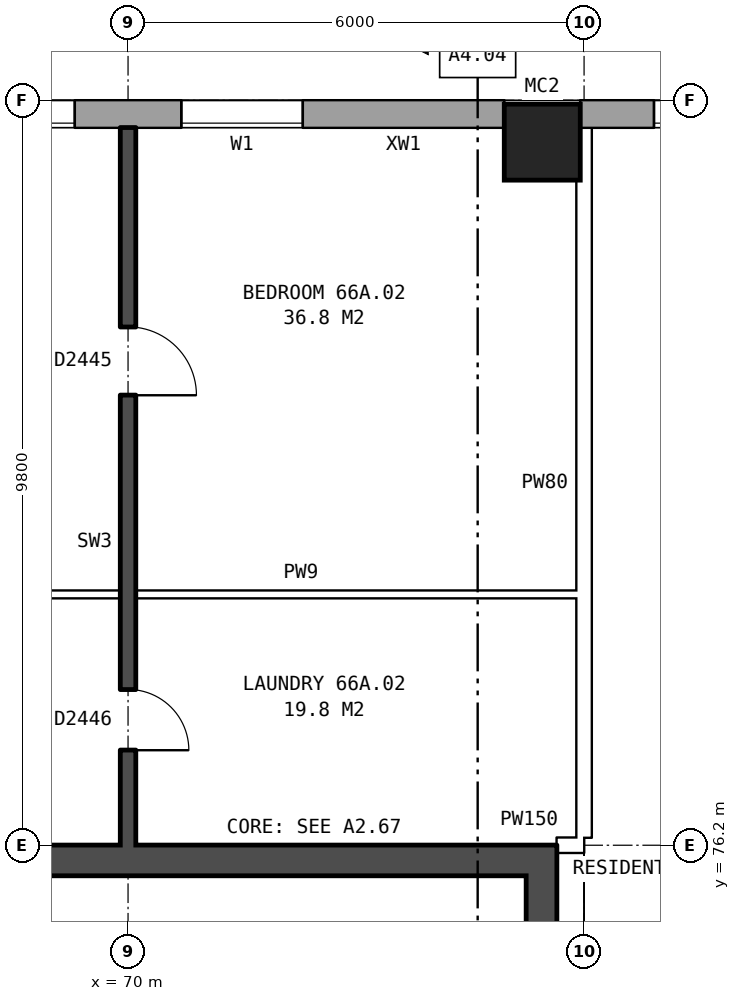
"""IFC4 building model, lengths in metres.
Left out: names, types, materials, properties, quantities, classifications, styles, units other than length and angle.
Written with IfcOpenShell. Run it as: python <this file> out.ifc"""

import sys

from ifc_helpers import new_model, si_unit, direction, frame, frame_2d, origin, origin_2d, place, context, subcontext, project, spatial, rectangle, hollow_rectangle, extrude, element, fill, save


model = new_model("IFC4")
c1 = context("Model", 3, precision=1e-05, world=origin(), true_north=direction((0.0, 1.0)))
c2 = subcontext(c1, "Body", "Model", "MODEL_VIEW")
j1 = project(units=[si_unit("LENGTHUNIT", "METRE"), si_unit("PLANEANGLEUNIT", "RADIAN")], contexts=[c1])
p1 = place(None, origin())
s1 = spatial("IfcSite", under=j1, at=p1, CompositionType="ELEMENT")
p2 = place(p1, origin())
s2 = spatial("IfcBuilding", under=s1, at=p2, CompositionType="ELEMENT")
p3 = place(p2, frame((0.0, 0.0, 233.8)))
s3 = spatial("IfcBuildingStorey", under=s2, at=p3, CompositionType="ELEMENT", Elevation=233.8)
p4 = place(p3, frame((75.45, 85.45, 0.0), z_axis=(0.0, 0.0, 1.0), x_axis=(1.0, 0.0, 0.0)))
e1 = element("IfcColumn", 1, at=p4, inside=s3, PredefinedType="COLUMN", context=c2, shape_type="SweptSolid", body=[
    extrude(hollow_rectangle(XDim=1.0, YDim=1.0, WallThickness=0.055, at=origin_2d()), origin(), (0.0, 0.0, 1.0), 3.1),
])
p5 = place(p3, frame((131.05, 85.82, 0.0), z_axis=(0.0, 0.0, 1.0), x_axis=(-1.0, 0.0, 0.0)))
e2 = element("IfcWall", 2, at=p5, inside=s3, PredefinedType="STANDARD", context=c2, shape_type="SweptSolid", body=[
    extrude(rectangle(XDim=55.1, YDim=0.36, at=frame_2d((27.55, 0.0))), origin(), (0.0, 0.0, 1.0), 2.85),
])
p6 = place(p5, frame((0.969, 0.0, 0.8)))
e3 = element("IfcOpeningElement", 3, at=p6, cuts=e2, PredefinedType="OPENING", context=c2, shape_type="SweptSolid", body=[
    extrude(rectangle(XDim=1.6, YDim=1.8, at=frame_2d((0.8, 0.9))), frame((0.0, 0.19, 0.0), z_axis=(0.0, -1.0, 0.0), x_axis=(1.0, 0.0, 0.0)), (0.0, 0.0, 1.0), 0.38),
])
p7 = place(p5, frame((4.406, 0.0, 0.8)))
e4 = element("IfcOpeningElement", 4, at=p7, cuts=e2, PredefinedType="OPENING", context=c2, shape_type="SweptSolid", body=[
    extrude(rectangle(XDim=1.6, YDim=1.8, at=frame_2d((0.8, 0.9))), frame((0.0, 0.19, 0.0), z_axis=(0.0, -1.0, 0.0), x_axis=(1.0, 0.0, 0.0)), (0.0, 0.0, 1.0), 0.38),
])
p8 = place(p5, frame((7.844, 0.0, 0.8)))
e5 = element("IfcOpeningElement", 5, at=p8, cuts=e2, PredefinedType="OPENING", context=c2, shape_type="SweptSolid", body=[
    extrude(rectangle(XDim=1.6, YDim=1.8, at=frame_2d((0.8, 0.9))), frame((0.0, 0.19, 0.0), z_axis=(0.0, -1.0, 0.0), x_axis=(1.0, 0.0, 0.0)), (0.0, 0.0, 1.0), 0.38),
])
p9 = place(p5, frame((11.281, 0.0, 0.8)))
e6 = element("IfcOpeningElement", 6, at=p9, cuts=e2, PredefinedType="OPENING", context=c2, shape_type="SweptSolid", body=[
    extrude(rectangle(XDim=1.6, YDim=1.8, at=frame_2d((0.8, 0.9))), frame((0.0, 0.19, 0.0), z_axis=(0.0, -1.0, 0.0), x_axis=(1.0, 0.0, 0.0)), (0.0, 0.0, 1.0), 0.38),
])
p10 = place(p5, frame((14.719, 0.0, 0.8)))
e7 = element("IfcOpeningElement", 7, at=p10, cuts=e2, PredefinedType="OPENING", context=c2, shape_type="SweptSolid", body=[
    extrude(rectangle(XDim=1.6, YDim=1.8, at=frame_2d((0.8, 0.9))), frame((0.0, 0.19, 0.0), z_axis=(0.0, -1.0, 0.0), x_axis=(1.0, 0.0, 0.0)), (0.0, 0.0, 1.0), 0.38),
])
p11 = place(p5, frame((18.156, 0.0, 0.8)))
e8 = element("IfcOpeningElement", 8, at=p11, cuts=e2, PredefinedType="OPENING", context=c2, shape_type="SweptSolid", body=[
    extrude(rectangle(XDim=1.6, YDim=1.8, at=frame_2d((0.8, 0.9))), frame((0.0, 0.19, 0.0), z_axis=(0.0, -1.0, 0.0), x_axis=(1.0, 0.0, 0.0)), (0.0, 0.0, 1.0), 0.38),
])
p12 = place(p5, frame((21.594, 0.0, 0.8)))
e9 = element("IfcOpeningElement", 9, at=p12, cuts=e2, PredefinedType="OPENING", context=c2, shape_type="SweptSolid", body=[
    extrude(rectangle(XDim=1.6, YDim=1.8, at=frame_2d((0.8, 0.9))), frame((0.0, 0.19, 0.0), z_axis=(0.0, -1.0, 0.0), x_axis=(1.0, 0.0, 0.0)), (0.0, 0.0, 1.0), 0.38),
])
p13 = place(p5, frame((25.031, 0.0, 0.8)))
e10 = element("IfcOpeningElement", 10, at=p13, cuts=e2, PredefinedType="OPENING", context=c2, shape_type="SweptSolid", body=[
    extrude(rectangle(XDim=1.6, YDim=1.8, at=frame_2d((0.8, 0.9))), frame((0.0, 0.19, 0.0), z_axis=(0.0, -1.0, 0.0), x_axis=(1.0, 0.0, 0.0)), (0.0, 0.0, 1.0), 0.38),
])
p14 = place(p5, frame((28.469, 0.0, 0.8)))
e11 = element("IfcOpeningElement", 11, at=p14, cuts=e2, PredefinedType="OPENING", context=c2, shape_type="SweptSolid", body=[
    extrude(rectangle(XDim=1.6, YDim=1.8, at=frame_2d((0.8, 0.9))), frame((0.0, 0.19, 0.0), z_axis=(0.0, -1.0, 0.0), x_axis=(1.0, 0.0, 0.0)), (0.0, 0.0, 1.0), 0.38),
])
p15 = place(p5, frame((31.906, 0.0, 0.8)))
e12 = element("IfcOpeningElement", 12, at=p15, cuts=e2, PredefinedType="OPENING", context=c2, shape_type="SweptSolid", body=[
    extrude(rectangle(XDim=1.6, YDim=1.8, at=frame_2d((0.8, 0.9))), frame((0.0, 0.19, 0.0), z_axis=(0.0, -1.0, 0.0), x_axis=(1.0, 0.0, 0.0)), (0.0, 0.0, 1.0), 0.38),
])
p16 = place(p5, frame((35.344, 0.0, 0.8)))
e13 = element("IfcOpeningElement", 13, at=p16, cuts=e2, PredefinedType="OPENING", context=c2, shape_type="SweptSolid", body=[
    extrude(rectangle(XDim=1.6, YDim=1.8, at=frame_2d((0.8, 0.9))), frame((0.0, 0.19, 0.0), z_axis=(0.0, -1.0, 0.0), x_axis=(1.0, 0.0, 0.0)), (0.0, 0.0, 1.0), 0.38),
])
p17 = place(p5, frame((38.781, 0.0, 0.8)))
e14 = element("IfcOpeningElement", 14, at=p17, cuts=e2, PredefinedType="OPENING", context=c2, shape_type="SweptSolid", body=[
    extrude(rectangle(XDim=1.6, YDim=1.8, at=frame_2d((0.8, 0.9))), frame((0.0, 0.19, 0.0), z_axis=(0.0, -1.0, 0.0), x_axis=(1.0, 0.0, 0.0)), (0.0, 0.0, 1.0), 0.38),
])
p18 = place(p5, frame((42.219, 0.0, 0.8)))
e15 = element("IfcOpeningElement", 15, at=p18, cuts=e2, PredefinedType="OPENING", context=c2, shape_type="SweptSolid", body=[
    extrude(rectangle(XDim=1.6, YDim=1.8, at=frame_2d((0.8, 0.9))), frame((0.0, 0.19, 0.0), z_axis=(0.0, -1.0, 0.0), x_axis=(1.0, 0.0, 0.0)), (0.0, 0.0, 1.0), 0.38),
])
p19 = place(p5, frame((45.656, 0.0, 0.8)))
e16 = element("IfcOpeningElement", 16, at=p19, cuts=e2, PredefinedType="OPENING", context=c2, shape_type="SweptSolid", body=[
    extrude(rectangle(XDim=1.6, YDim=1.8, at=frame_2d((0.8, 0.9))), frame((0.0, 0.19, 0.0), z_axis=(0.0, -1.0, 0.0), x_axis=(1.0, 0.0, 0.0)), (0.0, 0.0, 1.0), 0.38),
])
p20 = place(p5, frame((49.094, 0.0, 0.8)))
e17 = element("IfcOpeningElement", 17, at=p20, cuts=e2, PredefinedType="OPENING", context=c2, shape_type="SweptSolid", body=[
    extrude(rectangle(XDim=1.6, YDim=1.8, at=frame_2d((0.8, 0.9))), frame((0.0, 0.19, 0.0), z_axis=(0.0, -1.0, 0.0), x_axis=(1.0, 0.0, 0.0)), (0.0, 0.0, 1.0), 0.38),
])
p21 = place(p5, frame((52.531, 0.0, 0.8)))
e18 = element("IfcOpeningElement", 18, at=p21, cuts=e2, PredefinedType="OPENING", context=c2, shape_type="SweptSolid", body=[
    extrude(rectangle(XDim=1.6, YDim=1.8, at=frame_2d((0.8, 0.9))), frame((0.0, 0.19, 0.0), z_axis=(0.0, -1.0, 0.0), x_axis=(1.0, 0.0, 0.0)), (0.0, 0.0, 1.0), 0.38),
])
p22 = place(p3, frame((74.95, 85.82, 0.0), z_axis=(0.0, 0.0, 1.0), x_axis=(-1.0, 0.0, 0.0)))
e19 = element("IfcWall", 19, at=p22, inside=s3, PredefinedType="STANDARD", context=c2, shape_type="SweptSolid", body=[
    extrude(rectangle(XDim=39.875, YDim=0.36, at=frame_2d((19.938, 0.0))), origin(), (0.0, 0.0, 1.0), 2.85),
])
p23 = place(p22, frame((2.65, 0.0, 0.8)))
e20 = element("IfcOpeningElement", 20, at=p23, cuts=e19, PredefinedType="OPENING", context=c2, shape_type="SweptSolid", body=[
    extrude(rectangle(XDim=1.6, YDim=1.8, at=frame_2d((0.8, 0.9))), frame((0.0, 0.19, 0.0), z_axis=(0.0, -1.0, 0.0), x_axis=(1.0, 0.0, 0.0)), (0.0, 0.0, 1.0), 0.38),
])
p24 = place(p22, frame((5.65, 0.0, 0.8)))
e21 = element("IfcOpeningElement", 21, at=p24, cuts=e19, PredefinedType="OPENING", context=c2, shape_type="SweptSolid", body=[
    extrude(rectangle(XDim=1.6, YDim=1.8, at=frame_2d((0.8, 0.9))), frame((0.0, 0.19, 0.0), z_axis=(0.0, -1.0, 0.0), x_axis=(1.0, 0.0, 0.0)), (0.0, 0.0, 1.0), 0.38),
])
p25 = place(p22, frame((8.65, 0.0, 0.8)))
e22 = element("IfcOpeningElement", 22, at=p25, cuts=e19, PredefinedType="OPENING", context=c2, shape_type="SweptSolid", body=[
    extrude(rectangle(XDim=1.6, YDim=1.8, at=frame_2d((0.8, 0.9))), frame((0.0, 0.19, 0.0), z_axis=(0.0, -1.0, 0.0), x_axis=(1.0, 0.0, 0.0)), (0.0, 0.0, 1.0), 0.38),
])
p26 = place(p22, frame((11.65, 0.0, 0.8)))
e23 = element("IfcOpeningElement", 23, at=p26, cuts=e19, PredefinedType="OPENING", context=c2, shape_type="SweptSolid", body=[
    extrude(rectangle(XDim=1.6, YDim=1.8, at=frame_2d((0.8, 0.9))), frame((0.0, 0.19, 0.0), z_axis=(0.0, -1.0, 0.0), x_axis=(1.0, 0.0, 0.0)), (0.0, 0.0, 1.0), 0.38),
])
p27 = place(p22, frame((14.65, 0.0, 0.8)))
e24 = element("IfcOpeningElement", 24, at=p27, cuts=e19, PredefinedType="OPENING", context=c2, shape_type="SweptSolid", body=[
    extrude(rectangle(XDim=1.6, YDim=1.8, at=frame_2d((0.8, 0.9))), frame((0.0, 0.19, 0.0), z_axis=(0.0, -1.0, 0.0), x_axis=(1.0, 0.0, 0.0)), (0.0, 0.0, 1.0), 0.38),
])
p28 = place(p22, frame((17.65, 0.0, 0.8)))
e25 = element("IfcOpeningElement", 25, at=p28, cuts=e19, PredefinedType="OPENING", context=c2, shape_type="SweptSolid", body=[
    extrude(rectangle(XDim=1.6, YDim=1.8, at=frame_2d((0.8, 0.9))), frame((0.0, 0.19, 0.0), z_axis=(0.0, -1.0, 0.0), x_axis=(1.0, 0.0, 0.0)), (0.0, 0.0, 1.0), 0.38),
])
p29 = place(p22, frame((20.5, 0.0, 0.15)))
e26 = element("IfcOpeningElement", 26, at=p29, cuts=e19, PredefinedType="OPENING", context=c2, shape_type="SweptSolid", body=[
    extrude(rectangle(XDim=0.8, YDim=0.9, at=frame_2d((0.4, 0.45))), frame((0.0, 0.19, 0.0), z_axis=(0.0, -1.0, 0.0), x_axis=(1.0, 0.0, 0.0)), (0.0, 0.0, 1.0), 0.38),
])
p30 = place(p22, frame((23.65, 0.0, 0.8)))
e27 = element("IfcOpeningElement", 27, at=p30, cuts=e19, PredefinedType="OPENING", context=c2, shape_type="SweptSolid", body=[
    extrude(rectangle(XDim=1.6, YDim=1.8, at=frame_2d((0.8, 0.9))), frame((0.0, 0.19, 0.0), z_axis=(0.0, -1.0, 0.0), x_axis=(1.0, 0.0, 0.0)), (0.0, 0.0, 1.0), 0.38),
])
p31 = place(p22, frame((26.65, 0.0, 0.8)))
e28 = element("IfcOpeningElement", 28, at=p31, cuts=e19, PredefinedType="OPENING", context=c2, shape_type="SweptSolid", body=[
    extrude(rectangle(XDim=1.6, YDim=1.8, at=frame_2d((0.8, 0.9))), frame((0.0, 0.19, 0.0), z_axis=(0.0, -1.0, 0.0), x_axis=(1.0, 0.0, 0.0)), (0.0, 0.0, 1.0), 0.38),
])
p32 = place(p22, frame((29.65, 0.0, 0.8)))
e29 = element("IfcOpeningElement", 29, at=p32, cuts=e19, PredefinedType="OPENING", context=c2, shape_type="SweptSolid", body=[
    extrude(rectangle(XDim=1.6, YDim=1.8, at=frame_2d((0.8, 0.9))), frame((0.0, 0.19, 0.0), z_axis=(0.0, -1.0, 0.0), x_axis=(1.0, 0.0, 0.0)), (0.0, 0.0, 1.0), 0.38),
])
p33 = place(p22, frame((32.65, 0.0, 0.8)))
e30 = element("IfcOpeningElement", 30, at=p33, cuts=e19, PredefinedType="OPENING", context=c2, shape_type="SweptSolid", body=[
    extrude(rectangle(XDim=1.6, YDim=1.8, at=frame_2d((0.8, 0.9))), frame((0.0, 0.19, 0.0), z_axis=(0.0, -1.0, 0.0), x_axis=(1.0, 0.0, 0.0)), (0.0, 0.0, 1.0), 0.38),
])
p34 = place(p22, frame((35.65, 0.0, 0.8)))
e31 = element("IfcOpeningElement", 31, at=p34, cuts=e19, PredefinedType="OPENING", context=c2, shape_type="SweptSolid", body=[
    extrude(rectangle(XDim=1.6, YDim=1.8, at=frame_2d((0.8, 0.9))), frame((0.0, 0.19, 0.0), z_axis=(0.0, -1.0, 0.0), x_axis=(1.0, 0.0, 0.0)), (0.0, 0.0, 1.0), 0.38),
])
p35 = place(p3, frame((75.44, 63.8, 0.0), z_axis=(0.0, 0.0, 1.0), x_axis=(0.0, 1.0, 0.0)))
e32 = element("IfcWall", 32, at=p35, inside=s3, PredefinedType="SHEAR", context=c2, shape_type="SweptSolid", body=[
    extrude(rectangle(XDim=12.4, YDim=0.4, at=frame_2d((6.2, 0.0))), origin(), (0.0, 0.0, 1.0), 2.85),
])
p36 = place(p35, frame((9.8, 0.0, 0.0)))
e33 = element("IfcOpeningElement", 33, at=p36, cuts=e32, PredefinedType="OPENING", context=c2, shape_type="SweptSolid", body=[
    extrude(rectangle(XDim=1.1, YDim=2.1, at=frame_2d((0.55, 1.05))), frame((0.0, 0.21, 0.0), z_axis=(0.0, -1.0, 0.0), x_axis=(1.0, 0.0, 0.0)), (0.0, 0.0, 1.0), 0.42),
])
p37 = place(p3, frame((67.04, 76.0, 0.0), z_axis=(0.0, 0.0, 1.0), x_axis=(1.0, 0.0, 0.0)))
e34 = element("IfcWall", 34, at=p37, inside=s3, PredefinedType="SHEAR", context=c2, shape_type="SweptSolid", body=[
    extrude(rectangle(XDim=8.2, YDim=0.4, at=frame_2d((4.1, 0.0))), origin(), (0.0, 0.0, 1.0), 2.85),
])
p38 = place(p3, frame((75.64, 76.2, 0.0), z_axis=(0.0, 0.0, 1.0), x_axis=(1.0, 0.0, 0.0)))
e35 = element("IfcWall", 35, at=p38, inside=s3, PredefinedType="PARTITIONING", context=c2, shape_type="SweptSolid", body=[
    extrude(rectangle(XDim=0.36, YDim=0.2, at=frame_2d((0.18, 0.0))), origin(), (0.0, 0.0, 1.0), 2.85),
])
p39 = place(p3, frame((64.1, 79.5, 0.0), z_axis=(0.0, 0.0, 1.0), x_axis=(1.0, 0.0, 0.0)))
e36 = element("IfcWall", 36, at=p39, inside=s3, PredefinedType="PARTITIONING", context=c2, shape_type="SweptSolid", body=[
    extrude(rectangle(XDim=11.8, YDim=0.1, at=frame_2d((5.9, 0.0))), origin(), (0.0, 0.0, 1.0), 2.85),
])
p40 = place(p39, frame((3.65, 0.0, 0.0)))
e37 = element("IfcOpeningElement", 37, at=p40, cuts=e36, PredefinedType="OPENING", context=c2, shape_type="SweptSolid", body=[
    extrude(rectangle(XDim=0.9, YDim=2.1, at=frame_2d((0.45, 1.05))), frame((0.0, 0.06, 0.0), z_axis=(0.0, -1.0, 0.0), x_axis=(1.0, 0.0, 0.0)), (0.0, 0.0, 1.0), 0.12),
])
p41 = place(p39, frame((0.7, 0.0, 0.0)))
e38 = element("IfcOpeningElement", 38, at=p41, cuts=e36, PredefinedType="OPENING", context=c2, shape_type="SweptSolid", body=[
    extrude(rectangle(XDim=0.9, YDim=2.1, at=frame_2d((0.45, 1.05))), frame((0.0, 0.06, 0.0), z_axis=(0.0, -1.0, 0.0), x_axis=(1.0, 0.0, 0.0)), (0.0, 0.0, 1.0), 0.12),
])
p42 = place(p3, frame((70.0, 76.2, 0.0), z_axis=(0.0, 0.0, 1.0), x_axis=(0.0, 1.0, 0.0)))
e39 = element("IfcWall", 39, at=p42, inside=s3, PredefinedType="SOLIDWALL", context=c2, shape_type="SweptSolid", body=[
    extrude(rectangle(XDim=9.44, YDim=0.2, at=frame_2d((4.72, 0.0))), origin(), (0.0, 0.0, 1.0), 2.85),
])
p43 = place(p42, frame((5.92, 0.0, 0.0)))
e40 = element("IfcOpeningElement", 40, at=p43, cuts=e39, PredefinedType="OPENING", context=c2, shape_type="SweptSolid", body=[
    extrude(rectangle(XDim=0.9, YDim=2.1, at=frame_2d((0.45, 1.05))), frame((0.0, 0.11, 0.0), z_axis=(0.0, -1.0, 0.0), x_axis=(1.0, 0.0, 0.0)), (0.0, 0.0, 1.0), 0.22),
])
p44 = place(p42, frame((1.25, 0.0, 0.0)))
e41 = element("IfcOpeningElement", 41, at=p44, cuts=e39, PredefinedType="OPENING", context=c2, shape_type="SweptSolid", body=[
    extrude(rectangle(XDim=0.8, YDim=2.1, at=frame_2d((0.4, 1.05))), frame((0.0, 0.11, 0.0), z_axis=(0.0, -1.0, 0.0), x_axis=(1.0, 0.0, 0.0)), (0.0, 0.0, 1.0), 0.22),
])
p45 = place(p3, frame((76.0, 76.3, 0.0), z_axis=(0.0, 0.0, 1.0), x_axis=(0.0, 1.0, 0.0)))
e42 = element("IfcWall", 42, at=p45, inside=s3, PredefinedType="PARTITIONING", context=c2, shape_type="SweptSolid", body=[
    extrude(rectangle(XDim=9.34, YDim=0.2, at=frame_2d((4.67, 0.0))), origin(), (0.0, 0.0, 1.0), 2.85),
])
p46 = place(p21, origin())
e43 = element("IfcWindow", 43, at=p46, inside=s3, PartitioningType="SINGLE_PANEL", PredefinedType="WINDOW", context=c2, shape_type="SweptSolid", body=[
    extrude(rectangle(XDim=1.6, YDim=1.8, at=frame_2d((0.8, 0.9))), frame((0.0, 0.15, 0.0), z_axis=(0.0, -1.0, 0.0), x_axis=(1.0, 0.0, 0.0)), (0.0, 0.0, 1.0), 0.06),
])
fill(e18, e43)
p47 = place(p23, origin())
e44 = element("IfcWindow", 44, at=p47, inside=s3, PartitioningType="SINGLE_PANEL", PredefinedType="WINDOW", context=c2, shape_type="SweptSolid", body=[
    extrude(rectangle(XDim=1.6, YDim=1.8, at=frame_2d((0.8, 0.9))), frame((0.0, 0.15, 0.0), z_axis=(0.0, -1.0, 0.0), x_axis=(1.0, 0.0, 0.0)), (0.0, 0.0, 1.0), 0.06),
])
fill(e20, e44)
p48 = place(p24, origin())
e45 = element("IfcWindow", 45, at=p48, inside=s3, PartitioningType="SINGLE_PANEL", PredefinedType="WINDOW", context=c2, shape_type="SweptSolid", body=[
    extrude(rectangle(XDim=1.6, YDim=1.8, at=frame_2d((0.8, 0.9))), frame((0.0, 0.15, 0.0), z_axis=(0.0, -1.0, 0.0), x_axis=(1.0, 0.0, 0.0)), (0.0, 0.0, 1.0), 0.06),
])
fill(e21, e45)
p49 = place(p43, frame((0.9, 0.0, 0.0), z_axis=(0.0, 0.0, 1.0), x_axis=(-1.0, 0.0, 0.0)))
e46 = element("IfcDoor", 46, at=p49, inside=s3, OperationType="SINGLE_SWING_RIGHT", PredefinedType="DOOR", context=c2, shape_type="SweptSolid", body=[
    extrude(rectangle(XDim=0.9, YDim=2.1, at=frame_2d((0.45, 1.05))), frame((0.0, 0.025, 0.0), z_axis=(0.0, -1.0, 0.0), x_axis=(1.0, 0.0, 0.0)), (0.0, 0.0, 1.0), 0.05),
])
fill(e40, e46)
p50 = place(p44, frame((0.8, 0.0, 0.0), z_axis=(0.0, 0.0, 1.0), x_axis=(-1.0, 0.0, 0.0)))
e47 = element("IfcDoor", 47, at=p50, inside=s3, OperationType="SINGLE_SWING_RIGHT", PredefinedType="DOOR", context=c2, shape_type="SweptSolid", body=[
    extrude(rectangle(XDim=0.8, YDim=2.1, at=frame_2d((0.4, 1.05))), frame((0.0, 0.025, 0.0), z_axis=(0.0, -1.0, 0.0), x_axis=(1.0, 0.0, 0.0)), (0.0, 0.0, 1.0), 0.05),
])
fill(e41, e47)
save(model, sys.argv[1])
